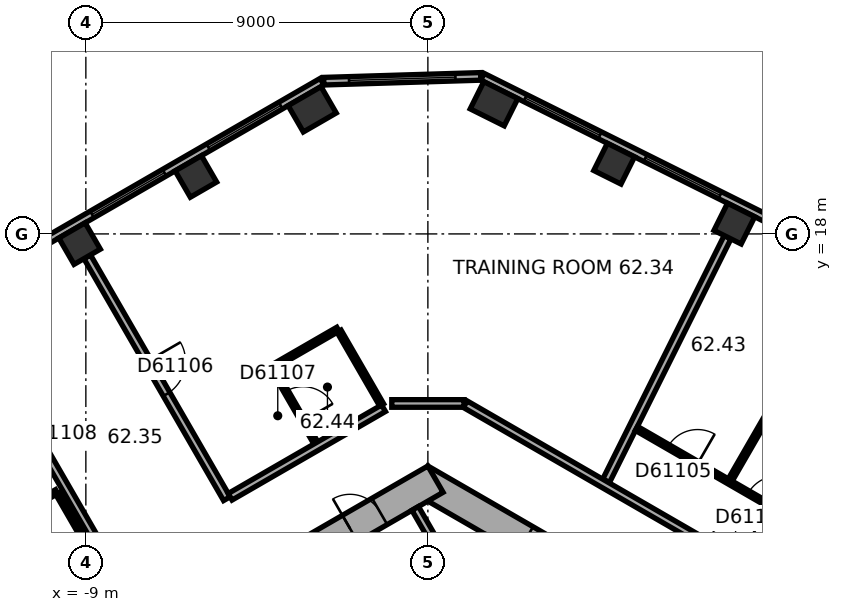
"""IFC4 building model, lengths in metres.
Left out: names, types, materials, properties, quantities, classifications, styles, units other than length and angle.
Written with IfcOpenShell. Run it as: python <this file> out.ifc"""

import sys

from ifc_helpers import new_model, si_unit, direction, frame, frame_2d, origin, origin_2d, place, context, subcontext, project, spatial, rectangle, extrude, element, fill, save


model = new_model("IFC4")
c1 = context("Model", 3, precision=1e-05, world=origin(), true_north=direction((0.0, 1.0)))
c2 = subcontext(c1, "Body", "Model", "MODEL_VIEW")
j1 = project(units=[si_unit("LENGTHUNIT", "METRE"), si_unit("PLANEANGLEUNIT", "RADIAN")], contexts=[c1])
p1 = place(None, origin())
s1 = spatial("IfcSite", under=j1, at=p1, CompositionType="ELEMENT")
p2 = place(p1, origin())
s2 = spatial("IfcBuilding", under=s1, at=p2, CompositionType="ELEMENT")
p3 = place(p2, frame((0.0, 0.0, 251.3)))
s3 = spatial("IfcBuildingStorey", under=s2, at=p3, CompositionType="ELEMENT", Elevation=251.3)
for number, where, z_axis, x_axis in (
    (1, (8.064, 18.271, 0.0), (0.0, 0.0, 1.0), (-0.895, 0.446, 0.0)),
    (2, (4.902, 19.848, 0.0), (0.0, 0.0, 1.0), (-0.895, 0.446, 0.0)),
):
    element("IfcColumn", number, at=place(p3, frame(where, z_axis=z_axis, x_axis=x_axis)), inside=s3, PredefinedType="COLUMN", context=c2, shape_type="SweptSolid", body=[
        extrude(rectangle(XDim=0.8, YDim=0.8, at=origin_2d()), origin(), (0.0, 0.0, 1.0), 3.7),
    ])
for number, where, z_axis, x_axis in (
    (3, (1.74, 21.425, 0.0), (0.0, 0.0, 1.0), (-0.895, 0.446, 0.0)),
    (4, (-3.044, 21.279, 0.0), (0.0, 0.0, 1.0), (-0.866, -0.5, 0.0)),
):
    element("IfcColumn", number, at=place(p3, frame(where, z_axis=z_axis, x_axis=x_axis)), inside=s3, PredefinedType="COLUMN", context=c2, shape_type="SweptSolid", body=[
        extrude(rectangle(XDim=1.0, YDim=0.8, at=origin_2d()), origin(), (0.0, 0.0, 1.0), 3.7),
    ])
for number, where, z_axis, x_axis in (
    (5, (-6.104, 19.512, 0.0), (0.0, 0.0, 1.0), (-0.866, -0.5, 0.0)),
    (6, (-9.165, 17.745, 0.0), (0.0, 0.0, 1.0), (-0.866, -0.5, 0.0)),
):
    element("IfcColumn", number, at=place(p3, frame(where, z_axis=z_axis, x_axis=x_axis)), inside=s3, PredefinedType="COLUMN", context=c2, shape_type="SweptSolid", body=[
        extrude(rectangle(XDim=0.8, YDim=0.8, at=origin_2d()), origin(), (0.0, 0.0, 1.0), 3.7),
    ])
p4 = place(p3, frame((10.1, 5.6, 0.0), z_axis=(0.0, 0.0, 1.0), x_axis=(-0.866023897231, 0.500002609418, 0.0)))
e7 = element("IfcWall", 7, at=p4, inside=s3, PredefinedType="SHEAR", context=c2, shape_type="SweptSolid", body=[
    extrude(rectangle(XDim=11.894, YDim=0.8, at=frame_2d((5.947, 0.0))), origin(), (0.0, 0.0, 1.0), 3.7),
])
p5 = place(p4, frame((3.897, 0.0, 0.0)))
e8 = element("IfcOpeningElement", 8, at=p5, cuts=e7, PredefinedType="OPENING", context=c2, shape_type="SweptSolid", body=[
    extrude(rectangle(XDim=0.9, YDim=2.1, at=frame_2d((0.45, 1.05))), frame((0.0, 0.41, 0.0), z_axis=(0.0, -1.0, 0.0), x_axis=(1.0, 0.0, 0.0)), (0.0, 0.0, 1.0), 0.82),
])
p6 = place(p4, frame((7.797, 0.0, 0.0)))
e9 = element("IfcOpeningElement", 9, at=p6, cuts=e7, PredefinedType="OPENING", context=c2, shape_type="SweptSolid", body=[
    extrude(rectangle(XDim=0.9, YDim=2.1, at=frame_2d((0.45, 1.05))), frame((0.0, 0.41, 0.0), z_axis=(0.0, -1.0, 0.0), x_axis=(1.0, 0.0, 0.0)), (0.0, 0.0, 1.0), 0.82),
])
p7 = place(p3, frame((0.2, 11.547, 0.0), z_axis=(0.0, 0.0, 1.0), x_axis=(-0.866023897231, -0.500002609418, 0.0)))
e10 = element("IfcWall", 10, at=p7, inside=s3, PredefinedType="SHEAR", context=c2, shape_type="SweptSolid", body=[
    extrude(rectangle(XDim=11.894, YDim=0.8, at=frame_2d((5.947, 0.0))), origin(), (0.0, 0.0, 1.0), 3.7),
])
p8 = place(p7, frame((6.147, 0.0, 0.0)))
e11 = element("IfcOpeningElement", 11, at=p8, cuts=e10, PredefinedType="OPENING", context=c2, shape_type="SweptSolid", body=[
    extrude(rectangle(XDim=1.5, YDim=2.1, at=frame_2d((0.75, 1.05))), frame((0.0, 0.41, 0.0), z_axis=(0.0, -1.0, 0.0), x_axis=(1.0, 0.0, 0.0)), (0.0, 0.0, 1.0), 0.82),
])
p9 = place(p7, frame((1.697, 0.0, 0.0)))
e12 = element("IfcOpeningElement", 12, at=p9, cuts=e10, PredefinedType="OPENING", context=c2, shape_type="SweptSolid", body=[
    extrude(rectangle(XDim=0.9, YDim=2.1, at=frame_2d((0.45, 1.05))), frame((0.0, 0.41, 0.0), z_axis=(0.0, -1.0, 0.0), x_axis=(1.0, 0.0, 0.0)), (0.0, 0.0, 1.0), 0.82),
])
p10 = place(p7, frame((4.297, 0.0, 0.0)))
e13 = element("IfcOpeningElement", 13, at=p10, cuts=e10, PredefinedType="OPENING", context=c2, shape_type="SweptSolid", body=[
    extrude(rectangle(XDim=0.9, YDim=2.1, at=frame_2d((0.45, 1.05))), frame((0.0, 0.41, 0.0), z_axis=(0.0, -1.0, 0.0), x_axis=(1.0, 0.0, 0.0)), (0.0, 0.0, 1.0), 0.82),
])
p11 = place(p3, frame((18.299, 13.727, 0.0), z_axis=(0.0, 0.0, 1.0), x_axis=(-0.894934554817, 0.44619742558, 0.0)))
e14 = element("IfcWall", 14, at=p11, inside=s3, PredefinedType="STANDARD", context=c2, shape_type="SweptSolid", body=[
    extrude(rectangle(XDim=18.841, YDim=0.2, at=frame_2d((9.421, 0.0))), origin(), (0.0, 0.0, 1.0), 3.7),
])
p12 = place(p11, frame((1.253, 0.0, 0.9)))
e15 = element("IfcOpeningElement", 15, at=p12, cuts=e14, PredefinedType="OPENING", context=c2, shape_type="SweptSolid", body=[
    extrude(rectangle(XDim=2.2, YDim=2.0, at=frame_2d((1.1, 1.0))), frame((0.0, 0.11, 0.0), z_axis=(0.0, -1.0, 0.0), x_axis=(1.0, 0.0, 0.0)), (0.0, 0.0, 1.0), 0.22),
])
p13 = place(p11, frame((4.786, 0.0, 0.9)))
e16 = element("IfcOpeningElement", 16, at=p13, cuts=e14, PredefinedType="OPENING", context=c2, shape_type="SweptSolid", body=[
    extrude(rectangle(XDim=2.2, YDim=2.0, at=frame_2d((1.1, 1.0))), frame((0.0, 0.11, 0.0), z_axis=(0.0, -1.0, 0.0), x_axis=(1.0, 0.0, 0.0)), (0.0, 0.0, 1.0), 0.22),
])
p14 = place(p11, frame((8.32, 0.0, 0.9)))
e17 = element("IfcOpeningElement", 17, at=p14, cuts=e14, PredefinedType="OPENING", context=c2, shape_type="SweptSolid", body=[
    extrude(rectangle(XDim=2.2, YDim=2.0, at=frame_2d((1.1, 1.0))), frame((0.0, 0.11, 0.0), z_axis=(0.0, -1.0, 0.0), x_axis=(1.0, 0.0, 0.0)), (0.0, 0.0, 1.0), 0.22),
])
p15 = place(p11, frame((11.854, 0.0, 0.9)))
e18 = element("IfcOpeningElement", 18, at=p15, cuts=e14, PredefinedType="OPENING", context=c2, shape_type="SweptSolid", body=[
    extrude(rectangle(XDim=2.2, YDim=2.0, at=frame_2d((1.1, 1.0))), frame((0.0, 0.11, 0.0), z_axis=(0.0, -1.0, 0.0), x_axis=(1.0, 0.0, 0.0)), (0.0, 0.0, 1.0), 0.22),
])
p16 = place(p11, frame((15.387, 0.0, 0.9)))
e19 = element("IfcOpeningElement", 19, at=p16, cuts=e14, PredefinedType="OPENING", context=c2, shape_type="SweptSolid", body=[
    extrude(rectangle(XDim=2.2, YDim=2.0, at=frame_2d((1.1, 1.0))), frame((0.0, 0.11, 0.0), z_axis=(0.0, -1.0, 0.0), x_axis=(1.0, 0.0, 0.0)), (0.0, 0.0, 1.0), 0.22),
])
p17 = place(p3, frame((1.389, 22.145, 0.0), z_axis=(0.0, 0.0, 1.0), x_axis=(-0.999534702881, -0.030502093955, 0.0)))
e20 = element("IfcWall", 20, at=p17, inside=s3, PredefinedType="STANDARD", context=c2, shape_type="SweptSolid", body=[
    extrude(rectangle(XDim=4.13, YDim=0.2, at=frame_2d((2.065, 0.0))), origin(), (0.0, 0.0, 1.0), 3.7),
])
p18 = place(p17, frame((0.665, 0.0, 0.9)))
e21 = element("IfcOpeningElement", 21, at=p18, cuts=e20, PredefinedType="OPENING", context=c2, shape_type="SweptSolid", body=[
    extrude(rectangle(XDim=2.8, YDim=2.0, at=frame_2d((1.4, 1.0))), frame((0.0, 0.11, 0.0), z_axis=(0.0, -1.0, 0.0), x_axis=(1.0, 0.0, 0.0)), (0.0, 0.0, 1.0), 0.22),
])
p19 = place(p3, frame((-2.786, 22.005, 0.0), z_axis=(0.0, 0.0, 1.0), x_axis=(-0.866026555358, -0.49999800541, 0.0)))
e22 = element("IfcWall", 22, at=p19, inside=s3, PredefinedType="STANDARD", context=c2, shape_type="SweptSolid", body=[
    extrude(rectangle(XDim=18.841, YDim=0.2, at=frame_2d((9.421, 0.0))), origin(), (0.0, 0.0, 1.0), 3.7),
])
p20 = place(p19, frame((1.254, 0.0, 0.9)))
e23 = element("IfcOpeningElement", 23, at=p20, cuts=e22, PredefinedType="OPENING", context=c2, shape_type="SweptSolid", body=[
    extrude(rectangle(XDim=2.2, YDim=2.0, at=frame_2d((1.1, 1.0))), frame((0.0, 0.11, 0.0), z_axis=(0.0, -1.0, 0.0), x_axis=(1.0, 0.0, 0.0)), (0.0, 0.0, 1.0), 0.22),
])
p21 = place(p19, frame((4.788, 0.0, 0.9)))
e24 = element("IfcOpeningElement", 24, at=p21, cuts=e22, PredefinedType="OPENING", context=c2, shape_type="SweptSolid", body=[
    extrude(rectangle(XDim=2.2, YDim=2.0, at=frame_2d((1.1, 1.0))), frame((0.0, 0.11, 0.0), z_axis=(0.0, -1.0, 0.0), x_axis=(1.0, 0.0, 0.0)), (0.0, 0.0, 1.0), 0.22),
])
p22 = place(p19, frame((8.321, 0.0, 0.9)))
e25 = element("IfcOpeningElement", 25, at=p22, cuts=e22, PredefinedType="OPENING", context=c2, shape_type="SweptSolid", body=[
    extrude(rectangle(XDim=2.2, YDim=2.0, at=frame_2d((1.1, 1.0))), frame((0.0, 0.11, 0.0), z_axis=(0.0, -1.0, 0.0), x_axis=(1.0, 0.0, 0.0)), (0.0, 0.0, 1.0), 0.22),
])
p23 = place(p19, frame((11.855, 0.0, 0.9)))
e26 = element("IfcOpeningElement", 26, at=p23, cuts=e22, PredefinedType="OPENING", context=c2, shape_type="SweptSolid", body=[
    extrude(rectangle(XDim=2.2, YDim=2.0, at=frame_2d((1.1, 1.0))), frame((0.0, 0.11, 0.0), z_axis=(0.0, -1.0, 0.0), x_axis=(1.0, 0.0, 0.0)), (0.0, 0.0, 1.0), 0.22),
])
p24 = place(p19, frame((15.389, 0.0, 0.9)))
e27 = element("IfcOpeningElement", 27, at=p24, cuts=e22, PredefinedType="OPENING", context=c2, shape_type="SweptSolid", body=[
    extrude(rectangle(XDim=2.2, YDim=2.0, at=frame_2d((1.1, 1.0))), frame((0.0, 0.11, 0.0), z_axis=(0.0, -1.0, 0.0), x_axis=(1.0, 0.0, 0.0)), (0.0, 0.0, 1.0), 0.22),
])
p25 = place(p3, frame((0.767, 8.872, 0.0), z_axis=(0.0, 0.0, 1.0), x_axis=(-0.499994660107, 0.866028486751, 0.0)))
e28 = element("IfcWall", 28, at=p25, inside=s3, PredefinedType="PARTITIONING", context=c2, shape_type="SweptSolid", body=[
    extrude(rectangle(XDim=2.2, YDim=0.2, at=frame_2d((1.1, 0.0))), origin(), (0.0, 0.0, 1.0), 3.35),
])
p26 = place(p3, frame((-12.025, 15.632, 0.0), z_axis=(0.0, 0.0, 1.0), x_axis=(0.499983153418, -0.866035129944, 0.0)))
e29 = element("IfcWall", 29, at=p26, inside=s3, PredefinedType="PARTITIONING", context=c2, shape_type="SweptSolid", body=[
    extrude(rectangle(XDim=7.35, YDim=0.2, at=frame_2d((3.675, 0.0))), origin(), (0.0, 0.0, 1.0), 3.35),
])
p27 = place(p26, frame((3.175, 0.0, 0.0)))
e30 = element("IfcOpeningElement", 30, at=p27, cuts=e29, PredefinedType="OPENING", context=c2, shape_type="SweptSolid", body=[
    extrude(rectangle(XDim=1.0, YDim=2.1, at=frame_2d((0.5, 1.05))), frame((0.0, 0.11, 0.0), z_axis=(0.0, -1.0, 0.0), x_axis=(1.0, 0.0, 0.0)), (0.0, 0.0, 1.0), 0.22),
])
p28 = place(p3, frame((-11.499, 10.22, 0.0), z_axis=(0.0, 0.0, 1.0), x_axis=(0.866010750942, 0.50002537861, 0.0)))
e31 = element("IfcWall", 31, at=p28, inside=s3, PredefinedType="PARTITIONING", context=c2, shape_type="SweptSolid", body=[
    extrude(rectangle(XDim=2.0, YDim=0.12, at=frame_2d((1.0, 0.0))), origin(), (0.0, 0.0, 1.0), 3.35),
])
p29 = place(p3, frame((-9.737, 11.168, 0.0), z_axis=(0.0, 0.0, 1.0), x_axis=(0.500030632641, -0.866007717299, 0.0)))
e32 = element("IfcWall", 32, at=p29, inside=s3, PredefinedType="PARTITIONING", context=c2, shape_type="SweptSolid", body=[
    extrude(rectangle(XDim=2.24, YDim=0.12, at=frame_2d((1.12, 0.0))), origin(), (0.0, 0.0, 1.0), 3.35),
])
p30 = place(p3, frame((-8.965, 17.399, 0.0), z_axis=(0.0, 0.0, 1.0), x_axis=(0.499993683172, -0.866029050776, 0.0)))
e33 = element("IfcWall", 33, at=p30, inside=s3, PredefinedType="PARTITIONING", context=c2, shape_type="SweptSolid", body=[
    extrude(rectangle(XDim=7.35, YDim=0.2, at=frame_2d((3.675, 0.0))), origin(), (0.0, 0.0, 1.0), 2.65),
])
p31 = place(p30, frame((3.175, 0.0, 0.0)))
e34 = element("IfcOpeningElement", 34, at=p31, cuts=e33, PredefinedType="OPENING", context=c2, shape_type="SweptSolid", body=[
    extrude(rectangle(XDim=1.0, YDim=2.1, at=frame_2d((0.5, 1.05))), frame((0.0, 0.11, 0.0), z_axis=(0.0, -1.0, 0.0), x_axis=(1.0, 0.0, 0.0)), (0.0, 0.0, 1.0), 0.22),
])
p32 = place(p3, frame((-4.099, 14.492, 0.0), z_axis=(0.0, 0.0, 1.0), x_axis=(0.866041268327, 0.499972520799, 0.0)))
e35 = element("IfcWall", 35, at=p32, inside=s3, PredefinedType="PARTITIONING", context=c2, shape_type="SweptSolid", body=[
    extrude(rectangle(XDim=2.0, YDim=0.12, at=frame_2d((1.0, 0.0))), origin(), (0.0, 0.0, 1.0), 3.35),
])
p33 = place(p3, frame((-2.948, 12.5, 0.0), z_axis=(0.0, 0.0, 1.0), x_axis=(-0.500077830873, 0.865980463445, 0.0)))
e36 = element("IfcWall", 36, at=p33, inside=s3, PredefinedType="PARTITIONING", context=c2, shape_type="SweptSolid", body=[
    extrude(rectangle(XDim=2.24, YDim=0.12, at=frame_2d((1.12, 0.0))), origin(), (0.0, 0.0, 1.0), 3.35),
])
p34 = place(p33, frame((0.67, 0.0, 0.0)))
e37 = element("IfcOpeningElement", 37, at=p34, cuts=e36, PredefinedType="OPENING", context=c2, shape_type="SweptSolid", body=[
    extrude(rectangle(XDim=0.9, YDim=2.1, at=frame_2d((0.45, 1.05))), frame((0.0, 0.07, 0.0), z_axis=(0.0, -1.0, 0.0), x_axis=(1.0, 0.0, 0.0)), (0.0, 0.0, 1.0), 0.14),
])
p35 = place(p3, frame((-2.336, 15.44, 0.0), z_axis=(0.0, 0.0, 1.0), x_axis=(0.49999608499, -0.866027664105, 0.0)))
e38 = element("IfcWall", 38, at=p35, inside=s3, PredefinedType="PARTITIONING", context=c2, shape_type="SweptSolid", body=[
    extrude(rectangle(XDim=2.24, YDim=0.12, at=frame_2d((1.12, 0.0))), origin(), (0.0, 0.0, 1.0), 3.35),
])
p36 = place(p3, frame((-1.167, 13.414, 0.0), z_axis=(0.0, 0.0, 1.0), x_axis=(-0.866023347809, -0.500003561037, 0.0)))
e39 = element("IfcWall", 39, at=p36, inside=s3, PredefinedType="PARTITIONING", context=c2, shape_type="SweptSolid", body=[
    extrude(rectangle(XDim=4.661, YDim=0.2, at=frame_2d((2.331, 0.0))), origin(), (0.0, 0.0, 1.0), 3.35),
])
p37 = place(p3, frame((0.95, 13.539, 0.0), z_axis=(0.0, 0.0, 1.0), x_axis=(-1.0, 0.0, 0.0)))
e40 = element("IfcWall", 40, at=p37, inside=s3, PredefinedType="PARTITIONING", context=c2, shape_type="SweptSolid", body=[
    extrude(rectangle(XDim=1.9, YDim=0.2, at=frame_2d((0.95, 0.0))), origin(), (0.0, 0.0, 1.0), 3.35),
])
p38 = place(p3, frame((7.886, 17.913, 0.0), z_axis=(0.0, 0.0, 1.0), x_axis=(-0.446204015428, -0.894931269213, 0.0)))
e41 = element("IfcWall", 41, at=p38, inside=s3, PredefinedType="PARTITIONING", context=c2, shape_type="SweptSolid", body=[
    extrude(rectangle(XDim=7.16, YDim=0.2, at=frame_2d((3.58, 0.0))), origin(), (0.0, 0.0, 1.0), 3.35),
])
p39 = place(p3, frame((10.805, 16.458, 0.0), z_axis=(0.0, 0.0, 1.0), x_axis=(-0.500025478307, -0.866010693377, 0.0)))
e42 = element("IfcWall", 42, at=p39, inside=s3, PredefinedType="PARTITIONING", context=c2, shape_type="SweptSolid", body=[
    extrude(rectangle(XDim=5.696, YDim=0.12, at=frame_2d((2.848, 0.0))), origin(), (0.0, 0.0, 1.0), 2.65),
])
p40 = place(p3, frame((11.25, 7.592, 0.0), z_axis=(0.0, 0.0, 1.0), x_axis=(-0.866024037175, 0.500002367029, 0.0)))
e43 = element("IfcWall", 43, at=p40, inside=s3, PredefinedType="PARTITIONING", context=c2, shape_type="SweptSolid", body=[
    extrude(rectangle(XDim=11.854, YDim=0.2, at=frame_2d((5.927, 0.0))), origin(), (0.0, 0.0, 1.0), 3.35),
])
p41 = place(p40, frame((3.59, 0.0, 0.0)))
e44 = element("IfcOpeningElement", 44, at=p41, cuts=e43, PredefinedType="OPENING", context=c2, shape_type="SweptSolid", body=[
    extrude(rectangle(XDim=1.0, YDim=2.1, at=frame_2d((0.5, 1.05))), frame((0.0, 0.11, 0.0), z_axis=(0.0, -1.0, 0.0), x_axis=(1.0, 0.0, 0.0)), (0.0, 0.0, 1.0), 0.22),
])
p42 = place(p3, frame((11.447, 9.441, 0.0), z_axis=(0.0, 0.0, 1.0), x_axis=(-0.866016001002, 0.500016285743, 0.0)))
e45 = element("IfcWall", 45, at=p42, inside=s3, PredefinedType="PARTITIONING", context=c2, shape_type="SweptSolid", body=[
    extrude(rectangle(XDim=6.881, YDim=0.12, at=frame_2d((3.44, 0.0))), origin(), (0.0, 0.0, 1.0), 3.35),
])
p43 = place(p42, frame((0.5, 0.0, 0.0)))
e46 = element("IfcOpeningElement", 46, at=p43, cuts=e45, PredefinedType="OPENING", context=c2, shape_type="SweptSolid", body=[
    extrude(rectangle(XDim=1.0, YDim=2.1, at=frame_2d((0.5, 1.05))), frame((0.0, 0.07, 0.0), z_axis=(0.0, -1.0, 0.0), x_axis=(1.0, 0.0, 0.0)), (0.0, 0.0, 1.0), 0.14),
])
p44 = place(p42, frame((2.583, 0.0, 0.0)))
e47 = element("IfcOpeningElement", 47, at=p44, cuts=e45, PredefinedType="OPENING", context=c2, shape_type="SweptSolid", body=[
    extrude(rectangle(XDim=0.9, YDim=2.1, at=frame_2d((0.45, 1.05))), frame((0.0, 0.07, 0.0), z_axis=(0.0, -1.0, 0.0), x_axis=(1.0, 0.0, 0.0)), (0.0, 0.0, 1.0), 0.14),
])
p45 = place(p42, frame((5.023, 0.0, 0.0)))
e48 = element("IfcOpeningElement", 48, at=p45, cuts=e45, PredefinedType="OPENING", context=c2, shape_type="SweptSolid", body=[
    extrude(rectangle(XDim=0.9, YDim=2.1, at=frame_2d((0.45, 1.05))), frame((0.0, 0.07, 0.0), z_axis=(0.0, -1.0, 0.0), x_axis=(1.0, 0.0, 0.0)), (0.0, 0.0, 1.0), 0.14),
])
p46 = place(p15, origin())
e49 = element("IfcWindow", 49, at=p46, inside=s3, PartitioningType="SINGLE_PANEL", PredefinedType="WINDOW", context=c2, shape_type="SweptSolid", body=[
    extrude(rectangle(XDim=2.2, YDim=2.0, at=frame_2d((1.1, 1.0))), frame((0.0, 0.03, 0.0), z_axis=(0.0, -1.0, 0.0), x_axis=(1.0, 0.0, 0.0)), (0.0, 0.0, 1.0), 0.06),
])
fill(e18, e49)
p47 = place(p16, origin())
e50 = element("IfcWindow", 50, at=p47, inside=s3, PartitioningType="SINGLE_PANEL", PredefinedType="WINDOW", context=c2, shape_type="SweptSolid", body=[
    extrude(rectangle(XDim=2.2, YDim=2.0, at=frame_2d((1.1, 1.0))), frame((0.0, 0.03, 0.0), z_axis=(0.0, -1.0, 0.0), x_axis=(1.0, 0.0, 0.0)), (0.0, 0.0, 1.0), 0.06),
])
fill(e19, e50)
p48 = place(p18, origin())
e51 = element("IfcWindow", 51, at=p48, inside=s3, PartitioningType="SINGLE_PANEL", PredefinedType="WINDOW", context=c2, shape_type="SweptSolid", body=[
    extrude(rectangle(XDim=2.8, YDim=2.0, at=frame_2d((1.4, 1.0))), frame((0.0, 0.03, 0.0), z_axis=(0.0, -1.0, 0.0), x_axis=(1.0, 0.0, 0.0)), (0.0, 0.0, 1.0), 0.06),
])
fill(e21, e51)
p49 = place(p20, origin())
e52 = element("IfcWindow", 52, at=p49, inside=s3, PartitioningType="SINGLE_PANEL", PredefinedType="WINDOW", context=c2, shape_type="SweptSolid", body=[
    extrude(rectangle(XDim=2.2, YDim=2.0, at=frame_2d((1.1, 1.0))), frame((0.0, 0.03, 0.0), z_axis=(0.0, -1.0, 0.0), x_axis=(1.0, 0.0, 0.0)), (0.0, 0.0, 1.0), 0.06),
])
fill(e23, e52)
p50 = place(p21, origin())
e53 = element("IfcWindow", 53, at=p50, inside=s3, PartitioningType="SINGLE_PANEL", PredefinedType="WINDOW", context=c2, shape_type="SweptSolid", body=[
    extrude(rectangle(XDim=2.2, YDim=2.0, at=frame_2d((1.1, 1.0))), frame((0.0, 0.03, 0.0), z_axis=(0.0, -1.0, 0.0), x_axis=(1.0, 0.0, 0.0)), (0.0, 0.0, 1.0), 0.06),
])
fill(e24, e53)
p51 = place(p9, origin())
e54 = element("IfcDoor", 54, at=p51, inside=s3, OperationType="SINGLE_SWING_LEFT", PredefinedType="DOOR", context=c2, shape_type="SweptSolid", body=[
    extrude(rectangle(XDim=0.9, YDim=2.1, at=frame_2d((0.45, 1.05))), frame((0.0, 0.025, 0.0), z_axis=(0.0, -1.0, 0.0), x_axis=(1.0, 0.0, 0.0)), (0.0, 0.0, 1.0), 0.05),
])
fill(e12, e54)
p52 = place(p44, origin())
e55 = element("IfcDoor", 55, at=p52, inside=s3, OperationType="SINGLE_SWING_LEFT", PredefinedType="DOOR", context=c2, shape_type="SweptSolid", body=[
    extrude(rectangle(XDim=0.9, YDim=2.1, at=frame_2d((0.45, 1.05))), frame((0.0, 0.025, 0.0), z_axis=(0.0, -1.0, 0.0), x_axis=(1.0, 0.0, 0.0)), (0.0, 0.0, 1.0), 0.05),
])
fill(e47, e55)
p53 = place(p45, origin())
e56 = element("IfcDoor", 56, at=p53, inside=s3, OperationType="SINGLE_SWING_LEFT", PredefinedType="DOOR", context=c2, shape_type="SweptSolid", body=[
    extrude(rectangle(XDim=0.9, YDim=2.1, at=frame_2d((0.45, 1.05))), frame((0.0, 0.025, 0.0), z_axis=(0.0, -1.0, 0.0), x_axis=(1.0, 0.0, 0.0)), (0.0, 0.0, 1.0), 0.05),
])
fill(e48, e56)
p54 = place(p31, origin())
e57 = element("IfcDoor", 57, at=p54, inside=s3, OperationType="SINGLE_SWING_LEFT", PredefinedType="DOOR", context=c2, shape_type="SweptSolid", body=[
    extrude(rectangle(XDim=1.0, YDim=2.1, at=frame_2d((0.5, 1.05))), frame((0.0, 0.025, 0.0), z_axis=(0.0, -1.0, 0.0), x_axis=(1.0, 0.0, 0.0)), (0.0, 0.0, 1.0), 0.05),
])
fill(e34, e57)
p55 = place(p34, origin())
e58 = element("IfcDoor", 58, at=p55, inside=s3, OperationType="SINGLE_SWING_LEFT", PredefinedType="DOOR", context=c2, shape_type="SweptSolid", body=[
    extrude(rectangle(XDim=0.9, YDim=2.1, at=frame_2d((0.45, 1.05))), frame((0.0, 0.025, 0.0), z_axis=(0.0, -1.0, 0.0), x_axis=(1.0, 0.0, 0.0)), (0.0, 0.0, 1.0), 0.05),
])
fill(e37, e58)
save(model, sys.argv[1])
